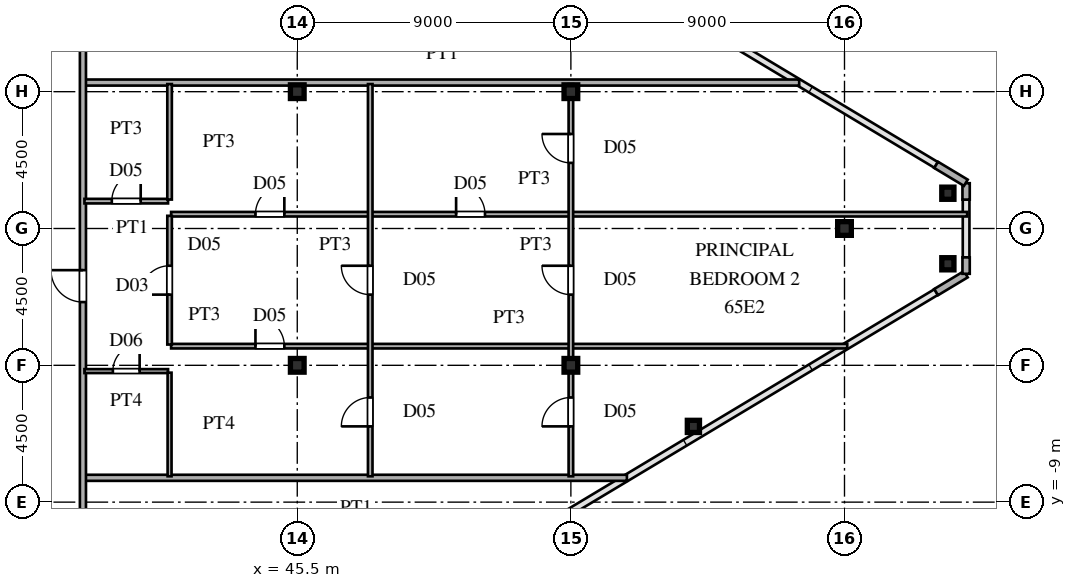
"""IFC4 building model, lengths in metres.
Left out: names, types, materials, properties, quantities, classifications, styles, units other than length and angle.
Written with IfcOpenShell. Run it as: python <this file> out.ifc"""

import sys

from ifc_helpers import new_model, si_unit, direction, frame, frame_2d, origin, origin_2d, place, context, subcontext, project, spatial, rectangle, hollow_rectangle, i_section, extrude, source, transform, mapped, element, fill, save


model = new_model("IFC4")
c1 = context("Model", 3, precision=1e-05, world=origin(), true_north=direction((0.0, 1.0)))
c2 = subcontext(c1, "Body", "Model", "MODEL_VIEW")
j1 = project(units=[si_unit("LENGTHUNIT", "METRE"), si_unit("PLANEANGLEUNIT", "RADIAN")], contexts=[c1])
p1 = place(None, origin())
s1 = spatial("IfcSite", under=j1, at=p1, CompositionType="ELEMENT")
p2 = place(p1, origin())
s2 = spatial("IfcBuilding", under=s1, at=p2, CompositionType="ELEMENT")
p3 = place(p2, frame((0.0, 0.0, 246.9)))
s3 = spatial("IfcBuildingStorey", under=s2, at=p3, CompositionType="ELEMENT", Elevation=246.9)
m1 = source(origin(), c2, "Body", "SweptSolid", [
    extrude(i_section(OverallWidth=0.45, OverallDepth=0.45, WebThickness=0.016, FlangeThickness=0.025, at=origin_2d()), origin(), (0.0, 0.0, 1.0), 3.75),
])
for number, where, z_axis, x_axis in (
    (1, (45.5, -4.5, 0.0), (0.0, 0.0, 1.0), (1.0, 0.0, 0.0)),
    (2, (45.5, 4.5, 0.0), (0.0, 0.0, 1.0), (1.0, 0.0, 0.0)),
    (3, (54.5, -4.5, 0.0), (0.0, 0.0, 1.0), (1.0, 0.0, 0.0)),
    (4, (54.5, 4.5, 0.0), (0.0, 0.0, 1.0), (1.0, 0.0, 0.0)),
    (5, (63.5, 0.0, 0.0), (0.0, 0.0, 1.0), (1.0, 0.0, 0.0)),
):
    element("IfcColumn", number, at=place(p3, frame(where, z_axis=z_axis, x_axis=x_axis)), inside=s3, PredefinedType="COLUMN", context=c2, shape_type="MappedRepresentation", body=[
        mapped(m1, transform((0.0, 0.0, 0.0), scale=1.0)),
    ])
m2 = source(origin(), c2, "Body", "SweptSolid", [
    extrude(hollow_rectangle(XDim=0.4, YDim=0.4, WallThickness=0.016, at=origin_2d()), origin(), (0.0, 0.0, 1.0), 3.75),
])
for number, where, z_axis, x_axis in (
    (6, (66.9, -1.16, 0.0), (0.0, 0.0, 1.0), (1.0, 0.0, 0.0)),
    (7, (66.9, 1.16, 0.0), (0.0, 0.0, 1.0), (1.0, 0.0, 0.0)),
    (8, (58.53, -6.509, 0.0), (0.0, 0.0, 1.0), (1.0, 0.0, 0.0)),
):
    element("IfcColumn", number, at=place(p3, frame(where, z_axis=z_axis, x_axis=x_axis)), inside=s3, PredefinedType="COLUMN", context=c2, shape_type="MappedRepresentation", body=[
        mapped(m2, transform((0.0, 0.0, 0.0), scale=1.0)),
    ])
p4 = place(p3, frame((66.514, -2.092, 0.0), z_axis=(0.0, 0.0, 1.0), x_axis=(0.85743623509, 0.514590228002, 0.0)))
e9 = element("IfcWall", 9, at=p4, inside=s3, PredefinedType="SOLIDWALL", context=c2, shape_type="SweptSolid", body=[
    extrude(rectangle(XDim=1.14, YDim=0.24, at=frame_2d((0.57, 0.0))), origin(), (0.0, 0.0, 1.0), 3.53),
])
for number, where, z_axis, x_axis in (
    (10, (67.5, -1.49, 0.0), (0.0, 0.0, 1.0), (0.0, 1.0, 0.0)),
    (11, (67.5, 0.95, 0.0), (0.0, 0.0, 1.0), (0.0, 1.0, 0.0)),
):
    element("IfcWall", number, at=place(p3, frame(where, z_axis=z_axis, x_axis=x_axis)), inside=s3, PredefinedType="SOLIDWALL", context=c2, shape_type="SweptSolid", body=[
        extrude(rectangle(XDim=0.54, YDim=0.24, at=frame_2d((0.27, 0.0))), origin(), (0.0, 0.0, 1.0), 3.53),
    ])
p5 = place(p3, frame((67.491, 1.505, 0.0), z_axis=(0.0, 0.0, 1.0), x_axis=(-0.85743623509, 0.514590228002, 0.0)))
e12 = element("IfcWall", 12, at=p5, inside=s3, PredefinedType="SOLIDWALL", context=c2, shape_type="SweptSolid", body=[
    extrude(rectangle(XDim=1.14, YDim=0.24, at=frame_2d((0.57, 0.0))), origin(), (0.0, 0.0, 1.0), 3.53),
])
p6 = place(p3, frame((38.53, -8.2, 0.0), z_axis=(0.0, 0.0, 1.0), x_axis=(1.0, 0.0, 0.0)))
e13 = element("IfcWall", 13, at=p6, inside=s3, PredefinedType="PARTITIONING", context=c2, shape_type="SweptSolid", body=[
    extrude(rectangle(XDim=17.813, YDim=0.2, at=frame_2d((8.906, 0.0))), origin(), (0.0, 0.0, 1.0), 3.53),
])
p7 = place(p3, frame((38.5, -4.69, 0.0), z_axis=(0.0, 0.0, 1.0), x_axis=(1.0, 0.0, 0.0)))
e14 = element("IfcWall", 14, at=p7, inside=s3, PredefinedType="PARTITIONING", context=c2, shape_type="SweptSolid", body=[
    extrude(rectangle(XDim=2.75, YDim=0.13, at=frame_2d((1.375, 0.0))), origin(), (0.0, 0.0, 1.0), 3.53),
])
p8 = place(p7, frame((0.935, 0.0, 0.0)))
e15 = element("IfcOpeningElement", 15, at=p8, cuts=e14, PredefinedType="OPENING", context=c2, shape_type="SweptSolid", body=[
    extrude(rectangle(XDim=0.88, YDim=2.1, at=frame_2d((0.44, 1.05))), frame((0.0, 0.075, 0.0), z_axis=(0.0, -1.0, 0.0), x_axis=(1.0, 0.0, 0.0)), (0.0, 0.0, 1.0), 0.15),
])
p9 = place(p3, frame((41.35, -3.87, 0.0), z_axis=(0.0, 0.0, 1.0), x_axis=(1.0, 0.0, 0.0)))
e16 = element("IfcWall", 16, at=p9, inside=s3, PredefinedType="PARTITIONING", context=c2, shape_type="SweptSolid", body=[
    extrude(rectangle(XDim=22.24, YDim=0.15, at=frame_2d((11.12, 0.0))), origin(), (0.0, 0.0, 1.0), 3.53),
])
p10 = place(p9, frame((2.775, 0.0, 0.0)))
e17 = element("IfcOpeningElement", 17, at=p10, cuts=e16, PredefinedType="OPENING", context=c2, shape_type="SweptSolid", body=[
    extrude(rectangle(XDim=0.95, YDim=2.15, at=frame_2d((0.475, 1.075))), frame((0.0, 0.085, 0.0), z_axis=(0.0, -1.0, 0.0), x_axis=(1.0, 0.0, 0.0)), (0.0, 0.0, 1.0), 0.17),
])
p11 = place(p3, frame((41.35, 0.47, 0.0), z_axis=(0.0, 0.0, 1.0), x_axis=(1.0, 0.0, 0.0)))
e18 = element("IfcWall", 18, at=p11, inside=s3, PredefinedType="PARTITIONING", context=c2, shape_type="SweptSolid", body=[
    extrude(rectangle(XDim=26.185, YDim=0.15, at=frame_2d((13.092, 0.0))), origin(), (0.0, 0.0, 1.0), 3.53),
])
p12 = place(p11, frame((2.775, 0.0, 0.0)))
e19 = element("IfcOpeningElement", 19, at=p12, cuts=e18, PredefinedType="OPENING", context=c2, shape_type="SweptSolid", body=[
    extrude(rectangle(XDim=0.95, YDim=2.15, at=frame_2d((0.475, 1.075))), frame((0.0, 0.085, 0.0), z_axis=(0.0, -1.0, 0.0), x_axis=(1.0, 0.0, 0.0)), (0.0, 0.0, 1.0), 0.17),
])
p13 = place(p11, frame((9.375, 0.0, 0.0)))
e20 = element("IfcOpeningElement", 20, at=p13, cuts=e18, PredefinedType="OPENING", context=c2, shape_type="SweptSolid", body=[
    extrude(rectangle(XDim=0.95, YDim=2.15, at=frame_2d((0.475, 1.075))), frame((0.0, 0.085, 0.0), z_axis=(0.0, -1.0, 0.0), x_axis=(1.0, 0.0, 0.0)), (0.0, 0.0, 1.0), 0.17),
])
p14 = place(p3, frame((38.5, 0.9, 0.0), z_axis=(0.0, 0.0, 1.0), x_axis=(1.0, 0.0, 0.0)))
e21 = element("IfcWall", 21, at=p14, inside=s3, PredefinedType="PARTITIONING", context=c2, shape_type="SweptSolid", body=[
    extrude(rectangle(XDim=2.75, YDim=0.15, at=frame_2d((1.375, 0.0))), origin(), (0.0, 0.0, 1.0), 3.53),
])
p15 = place(p14, frame((0.9, 0.0, 0.0)))
e22 = element("IfcOpeningElement", 22, at=p15, cuts=e21, PredefinedType="OPENING", context=c2, shape_type="SweptSolid", body=[
    extrude(rectangle(XDim=0.95, YDim=2.15, at=frame_2d((0.475, 1.075))), frame((0.0, 0.085, 0.0), z_axis=(0.0, -1.0, 0.0), x_axis=(1.0, 0.0, 0.0)), (0.0, 0.0, 1.0), 0.17),
])
p16 = place(p3, frame((38.53, 4.8, 0.0), z_axis=(0.0, 0.0, 1.0), x_axis=(1.0, 0.0, 0.0)))
e23 = element("IfcWall", 23, at=p16, inside=s3, PredefinedType="PARTITIONING", context=c2, shape_type="SweptSolid", body=[
    extrude(rectangle(XDim=23.48, YDim=0.2, at=frame_2d((11.74, 0.0))), origin(), (0.0, 0.0, 1.0), 3.53),
])
p17 = place(p3, frame((38.45, -15.515, 0.0), z_axis=(0.0, 0.0, 1.0), x_axis=(0.0, 1.0, 0.0)))
e24 = element("IfcWall", 24, at=p17, inside=s3, PredefinedType="PARTITIONING", context=c2, shape_type="SweptSolid", body=[
    extrude(rectangle(XDim=31.03, YDim=0.2, at=frame_2d((15.515, 0.0))), origin(), (0.0, 0.0, 1.0), 3.53),
])
p18 = place(p17, frame((3.09, 0.0, 0.0)))
e25 = element("IfcOpeningElement", 25, at=p18, cuts=e24, PredefinedType="OPENING", context=c2, shape_type="SweptSolid", body=[
    extrude(rectangle(XDim=1.05, YDim=2.25, at=frame_2d((0.525, 1.125))), frame((0.0, 0.11, 0.0), z_axis=(0.0, -1.0, 0.0), x_axis=(1.0, 0.0, 0.0)), (0.0, 0.0, 1.0), 0.22),
])
p19 = place(p17, frame((13.095, 0.0, 0.0)))
e26 = element("IfcOpeningElement", 26, at=p19, cuts=e24, PredefinedType="OPENING", context=c2, shape_type="SweptSolid", body=[
    extrude(rectangle(XDim=1.05, YDim=2.25, at=frame_2d((0.525, 1.125))), frame((0.0, 0.11, 0.0), z_axis=(0.0, -1.0, 0.0), x_axis=(1.0, 0.0, 0.0)), (0.0, 0.0, 1.0), 0.22),
])
p20 = place(p17, frame((25.19, 0.0, 0.0)))
e27 = element("IfcOpeningElement", 27, at=p20, cuts=e24, PredefinedType="OPENING", context=c2, shape_type="SweptSolid", body=[
    extrude(rectangle(XDim=1.05, YDim=2.25, at=frame_2d((0.525, 1.125))), frame((0.0, 0.11, 0.0), z_axis=(0.0, -1.0, 0.0), x_axis=(1.0, 0.0, 0.0)), (0.0, 0.0, 1.0), 0.22),
])
p21 = place(p3, frame((41.3, -8.15, 0.0), z_axis=(0.0, 0.0, 1.0), x_axis=(0.0, 1.0, 0.0)))
e28 = element("IfcWall", 28, at=p21, inside=s3, PredefinedType="PARTITIONING", context=c2, shape_type="SweptSolid", body=[
    extrude(rectangle(XDim=3.408, YDim=0.13, at=frame_2d((1.704, 0.0))), origin(), (0.0, 0.0, 1.0), 3.53),
])
p22 = place(p3, frame((41.3, -3.817, 0.0), z_axis=(0.0, 0.0, 1.0), x_axis=(0.0, 1.0, 0.0)))
e29 = element("IfcWall", 29, at=p22, inside=s3, PredefinedType="PARTITIONING", context=c2, shape_type="SweptSolid", body=[
    extrude(rectangle(XDim=4.234, YDim=0.15, at=frame_2d((2.117, 0.0))), origin(), (0.0, 0.0, 1.0), 3.53),
])
p23 = place(p22, frame((1.642, 0.0, 0.0)))
e30 = element("IfcOpeningElement", 30, at=p23, cuts=e29, PredefinedType="OPENING", context=c2, shape_type="SweptSolid", body=[
    extrude(rectangle(XDim=0.95, YDim=2.15, at=frame_2d((0.475, 1.075))), frame((0.0, 0.085, 0.0), z_axis=(0.0, -1.0, 0.0), x_axis=(1.0, 0.0, 0.0)), (0.0, 0.0, 1.0), 0.17),
])
p24 = place(p3, frame((41.3, 0.952, 0.0), z_axis=(0.0, 0.0, 1.0), x_axis=(0.0, 1.0, 0.0)))
e31 = element("IfcWall", 31, at=p24, inside=s3, PredefinedType="PARTITIONING", context=c2, shape_type="SweptSolid", body=[
    extrude(rectangle(XDim=3.798, YDim=0.15, at=frame_2d((1.899, 0.0))), origin(), (0.0, 0.0, 1.0), 3.53),
])
p25 = place(p3, frame((47.9, -8.15, 0.0), z_axis=(0.0, 0.0, 1.0), x_axis=(0.0, 1.0, 0.0)))
e32 = element("IfcWall", 32, at=p25, inside=s3, PredefinedType="PARTITIONING", context=c2, shape_type="SweptSolid", body=[
    extrude(rectangle(XDim=12.9, YDim=0.15, at=frame_2d((6.45, 0.0))), origin(), (0.0, 0.0, 1.0), 3.53),
])
p26 = place(p25, frame((5.975, 0.0, 0.0)))
e33 = element("IfcOpeningElement", 33, at=p26, cuts=e32, PredefinedType="OPENING", context=c2, shape_type="SweptSolid", body=[
    extrude(rectangle(XDim=0.95, YDim=2.15, at=frame_2d((0.475, 1.075))), frame((0.0, 0.085, 0.0), z_axis=(0.0, -1.0, 0.0), x_axis=(1.0, 0.0, 0.0)), (0.0, 0.0, 1.0), 0.17),
])
p27 = place(p25, frame((1.642, 0.0, 0.0)))
e34 = element("IfcOpeningElement", 34, at=p27, cuts=e32, PredefinedType="OPENING", context=c2, shape_type="SweptSolid", body=[
    extrude(rectangle(XDim=0.95, YDim=2.15, at=frame_2d((0.475, 1.075))), frame((0.0, 0.085, 0.0), z_axis=(0.0, -1.0, 0.0), x_axis=(1.0, 0.0, 0.0)), (0.0, 0.0, 1.0), 0.17),
])
p28 = place(p3, frame((54.5, -8.15, 0.0), z_axis=(0.0, 0.0, 1.0), x_axis=(0.0, 1.0, 0.0)))
e35 = element("IfcWall", 35, at=p28, inside=s3, PredefinedType="PARTITIONING", context=c2, shape_type="SweptSolid", body=[
    extrude(rectangle(XDim=12.9, YDim=0.15, at=frame_2d((6.45, 0.0))), origin(), (0.0, 0.0, 1.0), 2.93),
])
p29 = place(p28, frame((5.975, 0.0, 0.0)))
e36 = element("IfcOpeningElement", 36, at=p29, cuts=e35, PredefinedType="OPENING", context=c2, shape_type="SweptSolid", body=[
    extrude(rectangle(XDim=0.95, YDim=2.15, at=frame_2d((0.475, 1.075))), frame((0.0, 0.085, 0.0), z_axis=(0.0, -1.0, 0.0), x_axis=(1.0, 0.0, 0.0)), (0.0, 0.0, 1.0), 0.17),
])
p30 = place(p28, frame((1.642, 0.0, 0.0)))
e37 = element("IfcOpeningElement", 37, at=p30, cuts=e35, PredefinedType="OPENING", context=c2, shape_type="SweptSolid", body=[
    extrude(rectangle(XDim=0.95, YDim=2.15, at=frame_2d((0.475, 1.075))), frame((0.0, 0.085, 0.0), z_axis=(0.0, -1.0, 0.0), x_axis=(1.0, 0.0, 0.0)), (0.0, 0.0, 1.0), 0.17),
])
p31 = place(p28, frame((10.308, 0.0, 0.0)))
e38 = element("IfcOpeningElement", 38, at=p31, cuts=e35, PredefinedType="OPENING", context=c2, shape_type="SweptSolid", body=[
    extrude(rectangle(XDim=0.95, YDim=2.15, at=frame_2d((0.475, 1.075))), frame((0.0, 0.085, 0.0), z_axis=(0.0, -1.0, 0.0), x_axis=(1.0, 0.0, 0.0)), (0.0, 0.0, 1.0), 0.17),
])
m3 = source(origin(), c2, "Body", "SweptSolid", [
    extrude(rectangle(XDim=0.88, YDim=2.1, at=frame_2d((0.44, 1.05))), frame((0.0, 0.025, 0.0), z_axis=(0.0, -1.0, 0.0), x_axis=(1.0, 0.0, 0.0)), (0.0, 0.0, 1.0), 0.05),
])
p32 = place(p8, origin())
e39 = element("IfcDoor", 39, at=p32, inside=s3, OperationType="SINGLE_SWING_RIGHT", PredefinedType="DOOR", context=c2, shape_type="MappedRepresentation", body=[
    mapped(m3, transform((0.0, 0.0, 0.0), scale=1.0)),
])
fill(e15, e39)
m4 = source(origin(), c2, "Body", "SweptSolid", [
    extrude(rectangle(XDim=0.95, YDim=2.15, at=frame_2d((0.475, 1.075))), frame((0.0, 0.025, 0.0), z_axis=(0.0, -1.0, 0.0), x_axis=(1.0, 0.0, 0.0)), (0.0, 0.0, 1.0), 0.05),
])
p33 = place(p10, origin())
e40 = element("IfcDoor", 40, at=p33, inside=s3, OperationType="SINGLE_SWING_LEFT", PredefinedType="DOOR", context=c2, shape_type="MappedRepresentation", body=[
    mapped(m4, transform((0.0, 0.0, 0.0), scale=1.0)),
])
fill(e17, e40)
p34 = place(p12, origin())
e41 = element("IfcDoor", 41, at=p34, inside=s3, OperationType="SINGLE_SWING_RIGHT", PredefinedType="DOOR", context=c2, shape_type="MappedRepresentation", body=[
    mapped(m4, transform((0.0, 0.0, 0.0), scale=1.0)),
])
fill(e19, e41)
p35 = place(p13, origin())
e42 = element("IfcDoor", 42, at=p35, inside=s3, OperationType="SINGLE_SWING_LEFT", PredefinedType="DOOR", context=c2, shape_type="MappedRepresentation", body=[
    mapped(m4, transform((0.0, 0.0, 0.0), scale=1.0)),
])
fill(e20, e42)
p36 = place(p15, origin())
e43 = element("IfcDoor", 43, at=p36, inside=s3, OperationType="SINGLE_SWING_RIGHT", PredefinedType="DOOR", context=c2, shape_type="MappedRepresentation", body=[
    mapped(m4, transform((0.0, 0.0, 0.0), scale=1.0)),
])
fill(e22, e43)
m5 = source(origin(), c2, "Body", "SweptSolid", [
    extrude(rectangle(XDim=1.05, YDim=2.25, at=frame_2d((0.525, 1.125))), frame((0.0, 0.025, 0.0), z_axis=(0.0, -1.0, 0.0), x_axis=(1.0, 0.0, 0.0)), (0.0, 0.0, 1.0), 0.05),
])
p37 = place(p19, origin())
e44 = element("IfcDoor", 44, at=p37, inside=s3, OperationType="SINGLE_SWING_RIGHT", PredefinedType="DOOR", context=c2, shape_type="MappedRepresentation", body=[
    mapped(m5, transform((0.0, 0.0, 0.0), scale=1.0)),
])
fill(e26, e44)
p38 = place(p23, origin())
e45 = element("IfcDoor", 45, at=p38, inside=s3, OperationType="SINGLE_SWING_LEFT", PredefinedType="DOOR", context=c2, shape_type="MappedRepresentation", body=[
    mapped(m4, transform((0.0, 0.0, 0.0), scale=1.0)),
])
fill(e30, e45)
p39 = place(p26, origin())
e46 = element("IfcDoor", 46, at=p39, inside=s3, OperationType="SINGLE_SWING_RIGHT", PredefinedType="DOOR", context=c2, shape_type="MappedRepresentation", body=[
    mapped(m4, transform((0.0, 0.0, 0.0), scale=1.0)),
])
fill(e33, e46)
p40 = place(p27, origin())
e47 = element("IfcDoor", 47, at=p40, inside=s3, OperationType="SINGLE_SWING_LEFT", PredefinedType="DOOR", context=c2, shape_type="MappedRepresentation", body=[
    mapped(m4, transform((0.0, 0.0, 0.0), scale=1.0)),
])
fill(e34, e47)
p41 = place(p29, origin())
e48 = element("IfcDoor", 48, at=p41, inside=s3, OperationType="SINGLE_SWING_RIGHT", PredefinedType="DOOR", context=c2, shape_type="MappedRepresentation", body=[
    mapped(m4, transform((0.0, 0.0, 0.0), scale=1.0)),
])
fill(e36, e48)
p42 = place(p30, origin())
e49 = element("IfcDoor", 49, at=p42, inside=s3, OperationType="SINGLE_SWING_LEFT", PredefinedType="DOOR", context=c2, shape_type="MappedRepresentation", body=[
    mapped(m4, transform((0.0, 0.0, 0.0), scale=1.0)),
])
fill(e37, e49)
p43 = place(p31, origin())
e50 = element("IfcDoor", 50, at=p43, inside=s3, OperationType="SINGLE_SWING_RIGHT", PredefinedType="DOOR", context=c2, shape_type="MappedRepresentation", body=[
    mapped(m4, transform((0.0, 0.0, 0.0), scale=1.0)),
])
fill(e38, e50)
save(model, sys.argv[1])
